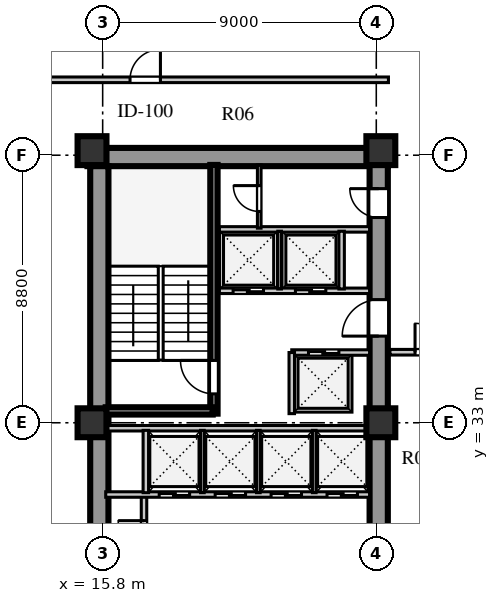
"""IFC4 building model, lengths in metres.
Left out: names, types, materials, properties, quantities, classifications, styles, units other than length and angle.
Written with IfcOpenShell. Run it as: python <this file> out.ifc"""

import sys

from ifc_helpers import new_model, si_unit, direction, frame, frame_2d, origin, origin_2d, place, context, subcontext, project, spatial, rectangle, extrude, element, fill, save


model = new_model("IFC4")
c1 = context("Model", 3, precision=1e-05, world=origin(), true_north=direction((0.0, 1.0)))
c2 = subcontext(c1, "Body", "Model", "MODEL_VIEW")
j1 = project(units=[si_unit("LENGTHUNIT", "METRE"), si_unit("PLANEANGLEUNIT", "RADIAN")], contexts=[c1])
p1 = place(None, origin())
s1 = spatial("IfcSite", under=j1, at=p1, CompositionType="ELEMENT")
p2 = place(p1, origin())
s2 = spatial("IfcBuilding", under=s1, at=p2, CompositionType="ELEMENT")
p3 = place(p2, frame((0.0, 0.0, 74.0)))
s3 = spatial("IfcBuildingStorey", under=s2, at=p3, CompositionType="ELEMENT", Elevation=74.0)
p4 = place(p3, frame((15.3, 41.74, 0.0), z_axis=(0.0, 0.0, 1.0), x_axis=(1.0, 0.0, 0.0)))
e1 = element("IfcWall", 1, at=p4, inside=s3, PredefinedType="SHEAR", context=c2, shape_type="SweptSolid", body=[
    extrude(rectangle(XDim=9.88, YDim=0.6, at=frame_2d((4.94, 0.0))), origin(), (0.0, 0.0, 1.0), 3.72),
])
p5 = place(p3, frame((15.69, 15.81, 0.0), z_axis=(0.0, 0.0, 1.0), x_axis=(0.0, 1.0, 0.0)))
e2 = element("IfcWall", 2, at=p5, inside=s3, PredefinedType="SHEAR", context=c2, shape_type="SweptSolid", body=[
    extrude(rectangle(XDim=25.63, YDim=0.6, at=frame_2d((12.815, 0.0))), origin(), (0.0, 0.0, 1.0), 3.72),
])
p6 = place(p3, frame((24.88, 15.74, 0.0), z_axis=(0.0, 0.0, 1.0), x_axis=(0.0, 1.0, 0.0)))
e3 = element("IfcWall", 3, at=p6, inside=s3, PredefinedType="SHEAR", context=c2, shape_type="SweptSolid", body=[
    extrude(rectangle(XDim=25.76, YDim=0.6, at=frame_2d((12.88, 0.0))), origin(), (0.0, 0.0, 1.0), 3.72),
])
p7 = place(p6, frame((1.61, 0.0, 0.0)))
e4 = element("IfcOpeningElement", 4, at=p7, cuts=e3, PredefinedType="OPENING", context=c2, shape_type="SweptSolid", body=[
    extrude(rectangle(XDim=1.2, YDim=2.1, at=frame_2d((0.6, 1.05))), frame((0.0, 0.31, 0.0), z_axis=(0.0, -1.0, 0.0), x_axis=(1.0, 0.0, 0.0)), (0.0, 0.0, 1.0), 0.62),
])
p8 = place(p6, frame((6.78, 0.0, 0.0)))
e5 = element("IfcOpeningElement", 5, at=p8, cuts=e3, PredefinedType="OPENING", context=c2, shape_type="SweptSolid", body=[
    extrude(rectangle(XDim=0.85, YDim=2.06, at=frame_2d((0.425, 1.03))), frame((0.0, 0.31, 0.0), z_axis=(0.0, -1.0, 0.0), x_axis=(1.0, 0.0, 0.0)), (0.0, 0.0, 1.0), 0.62),
])
p9 = place(p6, frame((12.11, 0.0, 0.0)))
e6 = element("IfcOpeningElement", 6, at=p9, cuts=e3, PredefinedType="OPENING", context=c2, shape_type="SweptSolid", body=[
    extrude(rectangle(XDim=1.5, YDim=2.12, at=frame_2d((0.75, 1.06))), frame((0.0, 0.31, 0.0), z_axis=(0.0, -1.0, 0.0), x_axis=(1.0, 0.0, 0.0)), (0.0, 0.0, 1.0), 0.62),
])
p10 = place(p6, frame((20.11, 0.0, 0.0)))
e7 = element("IfcOpeningElement", 7, at=p10, cuts=e3, PredefinedType="OPENING", context=c2, shape_type="SweptSolid", body=[
    extrude(rectangle(XDim=1.2, YDim=2.12, at=frame_2d((0.6, 1.06))), frame((0.0, 0.31, 0.0), z_axis=(0.0, -1.0, 0.0), x_axis=(1.0, 0.0, 0.0)), (0.0, 0.0, 1.0), 0.62),
])
p11 = place(p6, frame((24.01, 0.0, 0.0)))
e8 = element("IfcOpeningElement", 8, at=p11, cuts=e3, PredefinedType="OPENING", context=c2, shape_type="SweptSolid", body=[
    extrude(rectangle(XDim=0.95, YDim=2.1, at=frame_2d((0.475, 1.05))), frame((0.0, 0.31, 0.0), z_axis=(0.0, -1.0, 0.0), x_axis=(1.0, 0.0, 0.0)), (0.0, 0.0, 1.0), 0.62),
])
for number, where, z_axis, x_axis in (
    (9, (15.45, 33.0, 0.0), (0.0, 0.0, 1.0), (1.0, 0.0, 0.0)),
    (10, (15.45, 41.95, 0.0), (0.0, 0.0, 1.0), (1.0, 0.0, 0.0)),
    (11, (24.95, 33.0, 0.0), (0.0, 0.0, 1.0), (1.0, 0.0, 0.0)),
    (12, (24.95, 41.95, 0.0), (0.0, 0.0, 1.0), (1.0, 0.0, 0.0)),
):
    element("IfcColumn", number, at=place(p3, frame(where, z_axis=z_axis, x_axis=x_axis)), inside=s3, PredefinedType="COLUMN", context=c2, shape_type="SweptSolid", body=[
        extrude(rectangle(XDim=0.95, YDim=0.95, at=origin_2d()), origin(), (0.0, 0.0, 1.0), 3.72),
    ])
p12 = place(p3, frame((17.16, 26.58, 0.0), z_axis=(0.0, 0.0, 1.0), x_axis=(0.0, 1.0, 0.0)))
e13 = element("IfcWall", 13, at=p12, inside=s3, PredefinedType="SOLIDWALL", context=c2, shape_type="SweptSolid", body=[
    extrude(rectangle(XDim=4.02, YDim=0.18, at=frame_2d((2.01, 0.0))), origin(), (0.0, 0.0, 1.0), 3.72),
])
p13 = place(p12, frame((2.35, 0.0, 0.0)))
e14 = element("IfcOpeningElement", 14, at=p13, cuts=e13, PredefinedType="OPENING", context=c2, shape_type="SweptSolid", body=[
    extrude(rectangle(XDim=0.85, YDim=2.06, at=frame_2d((0.425, 1.03))), frame((0.0, 0.1, 0.0), z_axis=(0.0, -1.0, 0.0), x_axis=(1.0, 0.0, 0.0)), (0.0, 0.0, 1.0), 0.2),
])
p14 = place(p3, frame((15.9, 30.64, 0.0), z_axis=(0.0, 0.0, 1.0), x_axis=(1.0, 0.0, 0.0)))
e15 = element("IfcWall", 15, at=p14, inside=s3, PredefinedType="SOLIDWALL", context=c2, shape_type="SweptSolid", body=[
    extrude(rectangle(XDim=8.68, YDim=0.18, at=frame_2d((4.34, 0.0))), origin(), (0.0, 0.0, 1.0), 3.72),
])
p15 = place(p14, frame((1.76, 0.0, 0.0)))
e16 = element("IfcOpeningElement", 16, at=p15, cuts=e15, PredefinedType="OPENING", context=c2, shape_type="SweptSolid", body=[
    extrude(rectangle(XDim=1.0, YDim=2.1, at=frame_2d((0.5, 1.05))), frame((0.0, 0.1, 0.0), z_axis=(0.0, -1.0, 0.0), x_axis=(1.0, 0.0, 0.0)), (0.0, 0.0, 1.0), 0.2),
])
p16 = place(p14, frame((3.6, 0.0, 0.0)))
e17 = element("IfcOpeningElement", 17, at=p16, cuts=e15, PredefinedType="OPENING", context=c2, shape_type="SweptSolid", body=[
    extrude(rectangle(XDim=1.0, YDim=2.1, at=frame_2d((0.5, 1.05))), frame((0.0, 0.1, 0.0), z_axis=(0.0, -1.0, 0.0), x_axis=(1.0, 0.0, 0.0)), (0.0, 0.0, 1.0), 0.2),
])
p17 = place(p14, frame((5.44, 0.0, 0.0)))
e18 = element("IfcOpeningElement", 18, at=p17, cuts=e15, PredefinedType="OPENING", context=c2, shape_type="SweptSolid", body=[
    extrude(rectangle(XDim=1.0, YDim=2.1, at=frame_2d((0.5, 1.05))), frame((0.0, 0.1, 0.0), z_axis=(0.0, -1.0, 0.0), x_axis=(1.0, 0.0, 0.0)), (0.0, 0.0, 1.0), 0.2),
])
p18 = place(p14, frame((7.28, 0.0, 0.0)))
e19 = element("IfcOpeningElement", 19, at=p18, cuts=e15, PredefinedType="OPENING", context=c2, shape_type="SweptSolid", body=[
    extrude(rectangle(XDim=1.0, YDim=2.1, at=frame_2d((0.5, 1.05))), frame((0.0, 0.1, 0.0), z_axis=(0.0, -1.0, 0.0), x_axis=(1.0, 0.0, 0.0)), (0.0, 0.0, 1.0), 0.2),
])
p19 = place(p3, frame((15.9, 32.82, 0.0), z_axis=(0.0, 0.0, 1.0), x_axis=(1.0, 0.0, 0.0)))
e20 = element("IfcWall", 20, at=p19, inside=s3, PredefinedType="SOLIDWALL", context=c2, shape_type="SweptSolid", body=[
    extrude(rectangle(XDim=8.68, YDim=0.18, at=frame_2d((4.34, 0.0))), origin(), (0.0, 0.0, 1.0), 3.02),
])
p20 = place(p3, frame((17.22, 30.7, 0.0), z_axis=(0.0, 0.0, 1.0), x_axis=(0.0, 1.0, 0.0)))
e21 = element("IfcWall", 21, at=p20, inside=s3, PredefinedType="SOLIDWALL", context=c2, shape_type="SweptSolid", body=[
    extrude(rectangle(XDim=2.05, YDim=0.18, at=frame_2d((1.025, 0.0))), origin(), (0.0, 0.0, 1.0), 3.72),
])
for number, where, z_axis, x_axis in (
    (22, (19.08, 30.7, 0.0), (0.0, 0.0, 1.0), (0.0, 1.0, 0.0)),
    (23, (20.92, 30.7, 0.0), (0.0, 0.0, 1.0), (0.0, 1.0, 0.0)),
    (24, (22.76, 30.7, 0.0), (0.0, 0.0, 1.0), (0.0, 1.0, 0.0)),
):
    element("IfcWall", number, at=place(p3, frame(where, z_axis=z_axis, x_axis=x_axis)), inside=s3, PredefinedType="PARTITIONING", context=c2, shape_type="SweptSolid", body=[
        extrude(rectangle(XDim=2.05, YDim=0.12, at=frame_2d((1.025, 0.0))), origin(), (0.0, 0.0, 1.0), 3.72),
    ])
p21 = place(p3, frame((19.46, 33.3, 0.0), z_axis=(0.0, 0.0, 1.0), x_axis=(0.0, 1.0, 0.0)))
e25 = element("IfcWall", 25, at=p21, inside=s3, PredefinedType="SHEAR", context=c2, shape_type="SweptSolid", body=[
    extrude(rectangle(XDim=8.18, YDim=0.24, at=frame_2d((4.09, 0.0))), origin(), (0.0, 0.0, 1.0), 4.0),
])
p22 = place(p21, frame((0.65, 0.0, 0.0)))
e26 = element("IfcOpeningElement", 26, at=p22, cuts=e25, PredefinedType="OPENING", context=c2, shape_type="SweptSolid", body=[
    extrude(rectangle(XDim=1.1, YDim=2.1, at=frame_2d((0.55, 1.05))), frame((0.0, 0.13, 0.0), z_axis=(0.0, -1.0, 0.0), x_axis=(1.0, 0.0, 0.0)), (0.0, 0.0, 1.0), 0.26),
])
p23 = place(p3, frame((15.9, 33.39, 0.0), z_axis=(0.0, 0.0, 1.0), x_axis=(1.0, 0.0, 0.0)))
e27 = element("IfcWall", 27, at=p23, inside=s3, PredefinedType="SHEAR", context=c2, shape_type="SweptSolid", body=[
    extrude(rectangle(XDim=3.52, YDim=0.24, at=frame_2d((1.76, 0.0))), origin(), (0.0, 0.0, 1.0), 4.0),
])
p24 = place(p3, frame((22.02, 35.31, 0.0), z_axis=(0.0, 0.0, 1.0), x_axis=(1.0, 0.0, 0.0)))
e28 = element("IfcWall", 28, at=p24, inside=s3, PredefinedType="SOLIDWALL", context=c2, shape_type="SweptSolid", body=[
    extrude(rectangle(XDim=2.56, YDim=0.18, at=frame_2d((1.28, 0.0))), origin(), (0.0, 0.0, 1.0), 3.72),
])
p25 = place(p24, frame((0.55, 0.0, 0.0)))
e29 = element("IfcOpeningElement", 29, at=p25, cuts=e28, PredefinedType="OPENING", context=c2, shape_type="SweptSolid", body=[
    extrude(rectangle(XDim=1.0, YDim=2.1, at=frame_2d((0.5, 1.05))), frame((0.0, 0.1, 0.0), z_axis=(0.0, -1.0, 0.0), x_axis=(1.0, 0.0, 0.0)), (0.0, 0.0, 1.0), 0.2),
])
p26 = place(p3, frame((22.02, 33.3, 0.0), z_axis=(0.0, 0.0, 1.0), x_axis=(0.0, 1.0, 0.0)))
e30 = element("IfcWall", 30, at=p26, inside=s3, PredefinedType="SOLIDWALL", context=c2, shape_type="SweptSolid", body=[
    extrude(rectangle(XDim=2.01, YDim=0.18, at=frame_2d((1.005, 0.0))), origin(), (0.0, 0.0, 1.0), 3.72),
])
p27 = place(p3, frame((19.64, 37.34, 0.0), z_axis=(0.0, 0.0, 1.0), x_axis=(1.0, 0.0, 0.0)))
e31 = element("IfcWall", 31, at=p27, inside=s3, PredefinedType="SOLIDWALL", context=c2, shape_type="SweptSolid", body=[
    extrude(rectangle(XDim=4.94, YDim=0.18, at=frame_2d((2.47, 0.0))), origin(), (0.0, 0.0, 1.0), 3.72),
])
p28 = place(p27, frame((0.45, 0.0, 0.0)))
e32 = element("IfcOpeningElement", 32, at=p28, cuts=e31, PredefinedType="OPENING", context=c2, shape_type="SweptSolid", body=[
    extrude(rectangle(XDim=1.0, YDim=2.1, at=frame_2d((0.5, 1.05))), frame((0.0, 0.1, 0.0), z_axis=(0.0, -1.0, 0.0), x_axis=(1.0, 0.0, 0.0)), (0.0, 0.0, 1.0), 0.2),
])
p29 = place(p27, frame((2.5, 0.0, 0.0)))
e33 = element("IfcOpeningElement", 33, at=p29, cuts=e31, PredefinedType="OPENING", context=c2, shape_type="SweptSolid", body=[
    extrude(rectangle(XDim=1.0, YDim=2.1, at=frame_2d((0.5, 1.05))), frame((0.0, 0.1, 0.0), z_axis=(0.0, -1.0, 0.0), x_axis=(1.0, 0.0, 0.0)), (0.0, 0.0, 1.0), 0.2),
])
p30 = place(p3, frame((19.64, 39.36, 0.0), z_axis=(0.0, 0.0, 1.0), x_axis=(1.0, 0.0, 0.0)))
e34 = element("IfcWall", 34, at=p30, inside=s3, PredefinedType="SOLIDWALL", context=c2, shape_type="SweptSolid", body=[
    extrude(rectangle(XDim=4.94, YDim=0.18, at=frame_2d((2.47, 0.0))), origin(), (0.0, 0.0, 1.0), 3.72),
])
p31 = place(p3, frame((21.62, 37.4, 0.0), z_axis=(0.0, 0.0, 1.0), x_axis=(0.0, 1.0, 0.0)))
e35 = element("IfcWall", 35, at=p31, inside=s3, PredefinedType="PARTITIONING", context=c2, shape_type="SweptSolid", body=[
    extrude(rectangle(XDim=1.9, YDim=0.12, at=frame_2d((0.95, 0.0))), origin(), (0.0, 0.0, 1.0), 3.72),
])
p32 = place(p3, frame((23.66, 37.4, 0.0), z_axis=(0.0, 0.0, 1.0), x_axis=(0.0, 1.0, 0.0)))
e36 = element("IfcWall", 36, at=p32, inside=s3, PredefinedType="SOLIDWALL", context=c2, shape_type="SweptSolid", body=[
    extrude(rectangle(XDim=1.9, YDim=0.18, at=frame_2d((0.95, 0.0))), origin(), (0.0, 0.0, 1.0), 3.72),
])
p33 = place(p3, frame((20.95, 39.4, 0.0), z_axis=(0.0, 0.0, 1.0), x_axis=(0.0, 1.0, 0.0)))
e37 = element("IfcWall", 37, at=p33, inside=s3, PredefinedType="PARTITIONING", context=c2, shape_type="SweptSolid", body=[
    extrude(rectangle(XDim=2.08, YDim=0.12, at=frame_2d((1.04, 0.0))), origin(), (0.0, 0.0, 1.0), 3.72),
])
p34 = place(p33, frame((0.55, 0.0, 0.0)))
e38 = element("IfcOpeningElement", 38, at=p34, cuts=e37, PredefinedType="OPENING", context=c2, shape_type="SweptSolid", body=[
    extrude(rectangle(XDim=0.85, YDim=2.06, at=frame_2d((0.425, 1.03))), frame((0.0, 0.07, 0.0), z_axis=(0.0, -1.0, 0.0), x_axis=(1.0, 0.0, 0.0)), (0.0, 0.0, 1.0), 0.14),
])
p35 = place(p3, frame((25.25, 35.32, 0.0), z_axis=(0.0, 0.0, 1.0), x_axis=(1.0, 0.0, 0.0)))
e39 = element("IfcWall", 39, at=p35, inside=s3, PredefinedType="SOLIDWALL", context=c2, shape_type="SweptSolid", body=[
    extrude(rectangle(XDim=9.47, YDim=0.185, at=frame_2d((4.735, 0.0))), origin(), (0.0, 0.0, 1.0), 3.72),
])
p36 = place(p35, frame((0.825, 0.0, 0.0)))
e40 = element("IfcOpeningElement", 40, at=p36, cuts=e39, PredefinedType="OPENING", context=c2, shape_type="SweptSolid", body=[
    extrude(rectangle(XDim=0.95, YDim=2.08, at=frame_2d((0.475, 1.04))), frame((0.0, 0.103, 0.0), z_axis=(0.0, -1.0, 0.0), x_axis=(1.0, 0.0, 0.0)), (0.0, 0.0, 1.0), 0.205),
])
p37 = place(p35, frame((3.775, 0.0, 0.0)))
e41 = element("IfcOpeningElement", 41, at=p37, cuts=e39, PredefinedType="OPENING", context=c2, shape_type="SweptSolid", body=[
    extrude(rectangle(XDim=0.95, YDim=2.08, at=frame_2d((0.475, 1.04))), frame((0.0, 0.103, 0.0), z_axis=(0.0, -1.0, 0.0), x_axis=(1.0, 0.0, 0.0)), (0.0, 0.0, 1.0), 0.205),
])
p38 = place(p35, frame((7.215, 0.0, 0.0)))
e42 = element("IfcOpeningElement", 42, at=p38, cuts=e39, PredefinedType="OPENING", context=c2, shape_type="SweptSolid", body=[
    extrude(rectangle(XDim=0.95, YDim=2.08, at=frame_2d((0.475, 1.04))), frame((0.0, 0.103, 0.0), z_axis=(0.0, -1.0, 0.0), x_axis=(1.0, 0.0, 0.0)), (0.0, 0.0, 1.0), 0.205),
])
p39 = place(p3, frame((10.5, 44.28, 0.0), z_axis=(0.0, 0.0, 1.0), x_axis=(1.0, 0.0, 0.0)))
e43 = element("IfcWall", 43, at=p39, inside=s3, PredefinedType="SOLIDWALL", context=c2, shape_type="SweptSolid", body=[
    extrude(rectangle(XDim=14.7, YDim=0.185, at=frame_2d((7.35, 0.0))), origin(), (0.0, 0.0, 1.0), 3.72),
])
p40 = place(p39, frame((6.2, 0.0, 0.0)))
e44 = element("IfcOpeningElement", 44, at=p40, cuts=e43, PredefinedType="OPENING", context=c2, shape_type="SweptSolid", body=[
    extrude(rectangle(XDim=1.0, YDim=2.08, at=frame_2d((0.5, 1.04))), frame((0.0, 0.103, 0.0), z_axis=(0.0, -1.0, 0.0), x_axis=(1.0, 0.0, 0.0)), (0.0, 0.0, 1.0), 0.205),
])
p41 = place(p13, origin())
e45 = element("IfcDoor", 45, at=p41, inside=s3, OperationType="SINGLE_SWING_RIGHT", PredefinedType="DOOR", context=c2, shape_type="SweptSolid", body=[
    extrude(rectangle(XDim=0.85, YDim=2.06, at=frame_2d((0.425, 1.03))), frame((0.0, 0.025, 0.0), z_axis=(0.0, -1.0, 0.0), x_axis=(1.0, 0.0, 0.0)), (0.0, 0.0, 1.0), 0.05),
])
fill(e14, e45)
p42 = place(p15, frame((1.0, 0.0, 0.0), z_axis=(0.0, 0.0, 1.0), x_axis=(-1.0, 0.0, 0.0)))
e46 = element("IfcDoor", 46, at=p42, inside=s3, OperationType="DOUBLE_DOOR_SLIDING", PredefinedType="DOOR", context=c2, shape_type="SweptSolid", body=[
    extrude(rectangle(XDim=1.0, YDim=2.1, at=frame_2d((0.5, 1.05))), frame((0.0, 0.025, 0.0), z_axis=(0.0, -1.0, 0.0), x_axis=(1.0, 0.0, 0.0)), (0.0, 0.0, 1.0), 0.05),
])
fill(e16, e46)
p43 = place(p16, frame((1.0, 0.0, 0.0), z_axis=(0.0, 0.0, 1.0), x_axis=(-1.0, 0.0, 0.0)))
e47 = element("IfcDoor", 47, at=p43, inside=s3, OperationType="DOUBLE_DOOR_SLIDING", PredefinedType="DOOR", context=c2, shape_type="SweptSolid", body=[
    extrude(rectangle(XDim=1.0, YDim=2.1, at=frame_2d((0.5, 1.05))), frame((0.0, 0.025, 0.0), z_axis=(0.0, -1.0, 0.0), x_axis=(1.0, 0.0, 0.0)), (0.0, 0.0, 1.0), 0.05),
])
fill(e17, e47)
p44 = place(p17, frame((1.0, 0.0, 0.0), z_axis=(0.0, 0.0, 1.0), x_axis=(-1.0, 0.0, 0.0)))
e48 = element("IfcDoor", 48, at=p44, inside=s3, OperationType="DOUBLE_DOOR_SLIDING", PredefinedType="DOOR", context=c2, shape_type="SweptSolid", body=[
    extrude(rectangle(XDim=1.0, YDim=2.1, at=frame_2d((0.5, 1.05))), frame((0.0, 0.025, 0.0), z_axis=(0.0, -1.0, 0.0), x_axis=(1.0, 0.0, 0.0)), (0.0, 0.0, 1.0), 0.05),
])
fill(e18, e48)
p45 = place(p18, frame((1.0, 0.0, 0.0), z_axis=(0.0, 0.0, 1.0), x_axis=(-1.0, 0.0, 0.0)))
e49 = element("IfcDoor", 49, at=p45, inside=s3, OperationType="DOUBLE_DOOR_SLIDING", PredefinedType="DOOR", context=c2, shape_type="SweptSolid", body=[
    extrude(rectangle(XDim=1.0, YDim=2.1, at=frame_2d((0.5, 1.05))), frame((0.0, 0.025, 0.0), z_axis=(0.0, -1.0, 0.0), x_axis=(1.0, 0.0, 0.0)), (0.0, 0.0, 1.0), 0.05),
])
fill(e19, e49)
p46 = place(p22, origin())
e50 = element("IfcDoor", 50, at=p46, inside=s3, OperationType="SINGLE_SWING_RIGHT", PredefinedType="DOOR", context=c2, shape_type="SweptSolid", body=[
    extrude(rectangle(XDim=1.1, YDim=2.1, at=frame_2d((0.55, 1.05))), frame((0.0, 0.025, 0.0), z_axis=(0.0, -1.0, 0.0), x_axis=(1.0, 0.0, 0.0)), (0.0, 0.0, 1.0), 0.05),
])
fill(e26, e50)
p47 = place(p10, frame((1.2, 0.0, 0.0), z_axis=(0.0, 0.0, 1.0), x_axis=(-1.0, 0.0, 0.0)))
e51 = element("IfcDoor", 51, at=p47, inside=s3, OperationType="SINGLE_SWING_RIGHT", PredefinedType="DOOR", context=c2, shape_type="SweptSolid", body=[
    extrude(rectangle(XDim=1.2, YDim=2.12, at=frame_2d((0.6, 1.06))), frame((0.0, 0.025, 0.0), z_axis=(0.0, -1.0, 0.0), x_axis=(1.0, 0.0, 0.0)), (0.0, 0.0, 1.0), 0.05),
])
fill(e7, e51)
p48 = place(p28, frame((1.0, 0.0, 0.0), z_axis=(0.0, 0.0, 1.0), x_axis=(-1.0, 0.0, 0.0)))
e52 = element("IfcDoor", 52, at=p48, inside=s3, OperationType="DOUBLE_DOOR_SLIDING", PredefinedType="DOOR", context=c2, shape_type="SweptSolid", body=[
    extrude(rectangle(XDim=1.0, YDim=2.1, at=frame_2d((0.5, 1.05))), frame((0.0, 0.025, 0.0), z_axis=(0.0, -1.0, 0.0), x_axis=(1.0, 0.0, 0.0)), (0.0, 0.0, 1.0), 0.05),
])
fill(e32, e52)
p49 = place(p29, frame((1.0, 0.0, 0.0), z_axis=(0.0, 0.0, 1.0), x_axis=(-1.0, 0.0, 0.0)))
e53 = element("IfcDoor", 53, at=p49, inside=s3, OperationType="DOUBLE_DOOR_SLIDING", PredefinedType="DOOR", context=c2, shape_type="SweptSolid", body=[
    extrude(rectangle(XDim=1.0, YDim=2.1, at=frame_2d((0.5, 1.05))), frame((0.0, 0.025, 0.0), z_axis=(0.0, -1.0, 0.0), x_axis=(1.0, 0.0, 0.0)), (0.0, 0.0, 1.0), 0.05),
])
fill(e33, e53)
p50 = place(p25, origin())
e54 = element("IfcDoor", 54, at=p50, inside=s3, OperationType="DOUBLE_DOOR_SLIDING", PredefinedType="DOOR", context=c2, shape_type="SweptSolid", body=[
    extrude(rectangle(XDim=1.0, YDim=2.1, at=frame_2d((0.5, 1.05))), frame((0.0, 0.025, 0.0), z_axis=(0.0, -1.0, 0.0), x_axis=(1.0, 0.0, 0.0)), (0.0, 0.0, 1.0), 0.05),
])
fill(e29, e54)
p51 = place(p34, origin())
e55 = element("IfcDoor", 55, at=p51, inside=s3, OperationType="SINGLE_SWING_RIGHT", PredefinedType="DOOR", context=c2, shape_type="SweptSolid", body=[
    extrude(rectangle(XDim=0.85, YDim=2.06, at=frame_2d((0.425, 1.03))), frame((0.0, 0.025, 0.0), z_axis=(0.0, -1.0, 0.0), x_axis=(1.0, 0.0, 0.0)), (0.0, 0.0, 1.0), 0.05),
])
fill(e38, e55)
p52 = place(p11, frame((0.95, 0.0, 0.0), z_axis=(0.0, 0.0, 1.0), x_axis=(-1.0, 0.0, 0.0)))
e56 = element("IfcDoor", 56, at=p52, inside=s3, OperationType="SINGLE_SWING_LEFT", PredefinedType="DOOR", context=c2, shape_type="SweptSolid", body=[
    extrude(rectangle(XDim=0.95, YDim=2.1, at=frame_2d((0.475, 1.05))), frame((0.0, 0.025, 0.0), z_axis=(0.0, -1.0, 0.0), x_axis=(1.0, 0.0, 0.0)), (0.0, 0.0, 1.0), 0.05),
])
fill(e8, e56)
p53 = place(p40, origin())
e57 = element("IfcDoor", 57, at=p53, inside=s3, OperationType="SINGLE_SWING_RIGHT", PredefinedType="DOOR", context=c2, shape_type="SweptSolid", body=[
    extrude(rectangle(XDim=1.0, YDim=2.08, at=frame_2d((0.5, 1.04))), frame((0.0, 0.025, 0.0), z_axis=(0.0, -1.0, 0.0), x_axis=(1.0, 0.0, 0.0)), (0.0, 0.0, 1.0), 0.05),
])
fill(e44, e57)
p54 = place(p36, origin())
e58 = element("IfcDoor", 58, at=p54, inside=s3, OperationType="SINGLE_SWING_LEFT", PredefinedType="DOOR", context=c2, shape_type="SweptSolid", body=[
    extrude(rectangle(XDim=0.95, YDim=2.08, at=frame_2d((0.475, 1.04))), frame((0.0, 0.025, 0.0), z_axis=(0.0, -1.0, 0.0), x_axis=(1.0, 0.0, 0.0)), (0.0, 0.0, 1.0), 0.05),
])
fill(e40, e58)
save(model, sys.argv[1])
